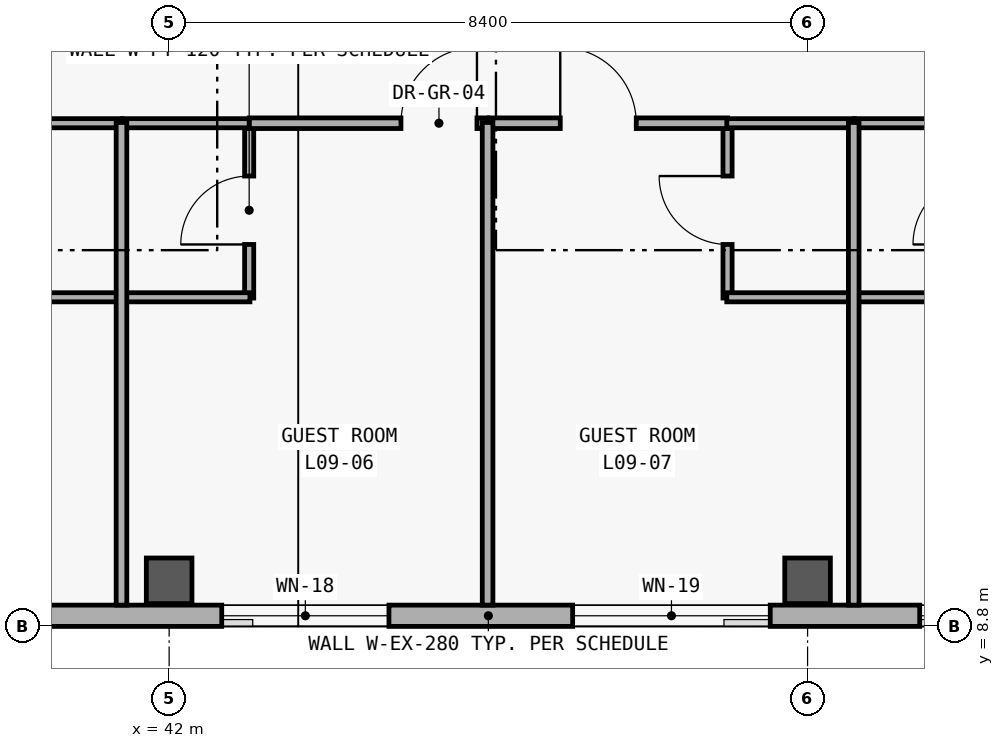
"""IFC4 building model, lengths in metres.
Left out: names, types, materials, properties, quantities, classifications, styles, units other than length and angle.
Written with IfcOpenShell. Run it as: python <this file> out.ifc"""

import sys

from ifc_helpers import new_model, si_unit, direction, frame, frame_2d, origin, origin_2d, place, context, subcontext, project, spatial, rectangle, extrude, element, fill, save


model = new_model("IFC4")
c1 = context("Model", 3, precision=1e-05, world=origin(), true_north=direction((0.0, 1.0)))
c2 = subcontext(c1, "Body", "Model", "MODEL_VIEW")
j1 = project(units=[si_unit("LENGTHUNIT", "METRE"), si_unit("PLANEANGLEUNIT", "RADIAN")], contexts=[c1])
p1 = place(None, origin())
s1 = spatial("IfcSite", under=j1, at=p1, CompositionType="ELEMENT")
p2 = place(p1, origin())
s2 = spatial("IfcBuilding", under=s1, at=p2, CompositionType="ELEMENT")
p3 = place(p2, frame((0.0, 0.0, 37.2)))
s3 = spatial("IfcBuildingStorey", under=s2, at=p3, CompositionType="ELEMENT", Elevation=37.2)
for number, where, z_axis, x_axis in (
    (1, (42.0, 9.4, 0.0), (0.0, 0.0, 1.0), (1.0, 0.0, 0.0)),
    (2, (50.4, 9.4, 0.0), (0.0, 0.0, 1.0), (1.0, 0.0, 0.0)),
):
    element("IfcColumn", number, at=place(p3, frame(where, z_axis=z_axis, x_axis=x_axis)), inside=s3, PredefinedType="COLUMN", context=c2, shape_type="SweptSolid", body=[
        extrude(rectangle(XDim=0.6, YDim=0.6, at=origin_2d()), origin(), (0.0, 0.0, 1.0), 3.6),
    ])
p4 = place(p3, frame((75.32, 8.94, 0.0), z_axis=(0.0, 0.0, 1.0), x_axis=(-1.0, 0.0, 0.0)))
e3 = element("IfcWall", 3, at=p4, inside=s3, PredefinedType="SOLIDWALL", context=c2, shape_type="SweptSolid", body=[
    extrude(rectangle(XDim=58.24, YDim=0.28, at=frame_2d((29.12, 0.0))), origin(), (0.0, 0.0, 1.0), 3.34),
])
p5 = place(p4, frame((53.861, 0.0, 0.85)))
e4 = element("IfcOpeningElement", 4, at=p5, cuts=e3, PredefinedType="OPENING", context=c2, shape_type="SweptSolid", body=[
    extrude(rectangle(XDim=3.5, YDim=2.0, at=frame_2d((1.75, 1.0))), frame((0.0, 0.15, 0.0), z_axis=(0.0, -1.0, 0.0), x_axis=(1.0, 0.0, 0.0)), (0.0, 0.0, 1.0), 0.3),
])
p6 = place(p4, frame((50.095, 0.0, 0.85)))
e5 = element("IfcOpeningElement", 5, at=p6, cuts=e3, PredefinedType="OPENING", context=c2, shape_type="SweptSolid", body=[
    extrude(rectangle(XDim=1.4, YDim=1.6, at=frame_2d((0.7, 0.8))), frame((0.0, 0.15, 0.0), z_axis=(0.0, -1.0, 0.0), x_axis=(1.0, 0.0, 0.0)), (0.0, 0.0, 1.0), 0.3),
])
p7 = place(p4, frame((45.178, 0.0, 0.85)))
e6 = element("IfcOpeningElement", 6, at=p7, cuts=e3, PredefinedType="OPENING", context=c2, shape_type="SweptSolid", body=[
    extrude(rectangle(XDim=1.6, YDim=1.6, at=frame_2d((0.8, 0.8))), frame((0.0, 0.15, 0.0), z_axis=(0.0, -1.0, 0.0), x_axis=(1.0, 0.0, 0.0)), (0.0, 0.0, 1.0), 0.3),
])
p8 = place(p4, frame((40.261, 0.0, 0.85)))
e7 = element("IfcOpeningElement", 7, at=p8, cuts=e3, PredefinedType="OPENING", context=c2, shape_type="SweptSolid", body=[
    extrude(rectangle(XDim=1.8, YDim=1.6, at=frame_2d((0.9, 0.8))), frame((0.0, 0.15, 0.0), z_axis=(0.0, -1.0, 0.0), x_axis=(1.0, 0.0, 0.0)), (0.0, 0.0, 1.0), 0.3),
])
p9 = place(p4, frame((35.345, 0.0, 0.85)))
e8 = element("IfcOpeningElement", 8, at=p9, cuts=e3, PredefinedType="OPENING", context=c2, shape_type="SweptSolid", body=[
    extrude(rectangle(XDim=2.0, YDim=1.65, at=frame_2d((1.0, 0.825))), frame((0.0, 0.15, 0.0), z_axis=(0.0, -1.0, 0.0), x_axis=(1.0, 0.0, 0.0)), (0.0, 0.0, 1.0), 0.3),
])
p10 = place(p4, frame((30.428, 0.0, 0.85)))
e9 = element("IfcOpeningElement", 9, at=p10, cuts=e3, PredefinedType="OPENING", context=c2, shape_type="SweptSolid", body=[
    extrude(rectangle(XDim=2.2, YDim=1.65, at=frame_2d((1.1, 0.825))), frame((0.0, 0.15, 0.0), z_axis=(0.0, -1.0, 0.0), x_axis=(1.0, 0.0, 0.0)), (0.0, 0.0, 1.0), 0.3),
])
p11 = place(p4, frame((25.411, 0.0, 0.85)))
e10 = element("IfcOpeningElement", 10, at=p11, cuts=e3, PredefinedType="OPENING", context=c2, shape_type="SweptSolid", body=[
    extrude(rectangle(XDim=2.6, YDim=2.2, at=frame_2d((1.3, 1.1))), frame((0.0, 0.15, 0.0), z_axis=(0.0, -1.0, 0.0), x_axis=(1.0, 0.0, 0.0)), (0.0, 0.0, 1.0), 0.3),
])
p12 = place(p4, frame((20.345, 0.0, 0.85)))
e11 = element("IfcOpeningElement", 11, at=p12, cuts=e3, PredefinedType="OPENING", context=c2, shape_type="SweptSolid", body=[
    extrude(rectangle(XDim=3.1, YDim=2.2, at=frame_2d((1.55, 1.1))), frame((0.0, 0.15, 0.0), z_axis=(0.0, -1.0, 0.0), x_axis=(1.0, 0.0, 0.0)), (0.0, 0.0, 1.0), 0.3),
])
p13 = place(p4, frame((15.278, 0.0, 0.85)))
e12 = element("IfcOpeningElement", 12, at=p13, cuts=e3, PredefinedType="OPENING", context=c2, shape_type="SweptSolid", body=[
    extrude(rectangle(XDim=3.6, YDim=2.3, at=frame_2d((1.8, 1.15))), frame((0.0, 0.15, 0.0), z_axis=(0.0, -1.0, 0.0), x_axis=(1.0, 0.0, 0.0)), (0.0, 0.0, 1.0), 0.3),
])
p14 = place(p4, frame((11.636, 0.0, 0.85)))
e13 = element("IfcOpeningElement", 13, at=p14, cuts=e3, PredefinedType="OPENING", context=c2, shape_type="SweptSolid", body=[
    extrude(rectangle(XDim=1.25, YDim=1.45, at=frame_2d((0.625, 0.725))), frame((0.0, 0.15, 0.0), z_axis=(0.0, -1.0, 0.0), x_axis=(1.0, 0.0, 0.0)), (0.0, 0.0, 1.0), 0.3),
])
p15 = place(p4, frame((6.77, 0.0, 0.85)))
e14 = element("IfcOpeningElement", 14, at=p15, cuts=e3, PredefinedType="OPENING", context=c2, shape_type="SweptSolid", body=[
    extrude(rectangle(XDim=1.35, YDim=1.55, at=frame_2d((0.675, 0.775))), frame((0.0, 0.15, 0.0), z_axis=(0.0, -1.0, 0.0), x_axis=(1.0, 0.0, 0.0)), (0.0, 0.0, 1.0), 0.3),
])
p16 = place(p4, frame((1.904, 0.0, 0.85)))
e15 = element("IfcOpeningElement", 15, at=p16, cuts=e3, PredefinedType="OPENING", context=c2, shape_type="SweptSolid", body=[
    extrude(rectangle(XDim=1.45, YDim=1.65, at=frame_2d((0.725, 0.825))), frame((0.0, 0.15, 0.0), z_axis=(0.0, -1.0, 0.0), x_axis=(1.0, 0.0, 0.0)), (0.0, 0.0, 1.0), 0.3),
])
p17 = place(p3, frame((43.053, 13.12, 0.0), z_axis=(0.0, 0.0, 1.0), x_axis=(0.0, 1.0, 0.0)))
e16 = element("IfcWall", 16, at=p17, inside=s3, PredefinedType="PARTITIONING", context=c2, shape_type="SweptSolid", body=[
    extrude(rectangle(XDim=2.31, YDim=0.12, at=frame_2d((1.155, 0.0))), origin(), (0.0, 0.0, 1.0), 2.48),
])
p18 = place(p17, frame((0.705, 0.0, 0.0)))
e17 = element("IfcOpeningElement", 17, at=p18, cuts=e16, PredefinedType="OPENING", context=c2, shape_type="SweptSolid", body=[
    extrude(rectangle(XDim=0.9, YDim=2.18, at=frame_2d((0.45, 1.09))), frame((0.0, 0.07, 0.0), z_axis=(0.0, -1.0, 0.0), x_axis=(1.0, 0.0, 0.0)), (0.0, 0.0, 1.0), 0.14),
])
p19 = place(p3, frame((49.347, 13.12, 0.0), z_axis=(0.0, 0.0, 1.0), x_axis=(0.0, 1.0, 0.0)))
e18 = element("IfcWall", 18, at=p19, inside=s3, PredefinedType="PARTITIONING", context=c2, shape_type="SweptSolid", body=[
    extrude(rectangle(XDim=2.31, YDim=0.12, at=frame_2d((1.155, 0.0))), origin(), (0.0, 0.0, 1.0), 2.48),
])
p20 = place(p19, frame((0.705, 0.0, 0.0)))
e19 = element("IfcOpeningElement", 19, at=p20, cuts=e18, PredefinedType="OPENING", context=c2, shape_type="SweptSolid", body=[
    extrude(rectangle(XDim=0.9, YDim=2.18, at=frame_2d((0.45, 1.09))), frame((0.0, 0.07, 0.0), z_axis=(0.0, -1.0, 0.0), x_axis=(1.0, 0.0, 0.0)), (0.0, 0.0, 1.0), 0.14),
])
p21 = place(p3, frame((43.053, 15.42, 0.0), z_axis=(0.0, 0.0, 1.0), x_axis=(1.0, 0.0, 0.0)))
e20 = element("IfcWall", 20, at=p21, inside=s3, PredefinedType="PARTITIONING", context=c2, shape_type="SweptSolid", body=[
    extrude(rectangle(XDim=3.137, YDim=0.14, at=frame_2d((1.568, 0.0))), origin(), (0.0, 0.0, 1.0), 2.48),
])
p22 = place(p21, frame((1.997, 0.0, 0.0)))
e21 = element("IfcOpeningElement", 21, at=p22, cuts=e20, PredefinedType="OPENING", context=c2, shape_type="SweptSolid", body=[
    extrude(rectangle(XDim=1.0, YDim=2.28, at=frame_2d((0.5, 1.14))), frame((0.0, 0.08, 0.0), z_axis=(0.0, -1.0, 0.0), x_axis=(1.0, 0.0, 0.0)), (0.0, 0.0, 1.0), 0.16),
])
p23 = place(p3, frame((46.21, 15.42, 0.0), z_axis=(0.0, 0.0, 1.0), x_axis=(1.0, 0.0, 0.0)))
e22 = element("IfcWall", 22, at=p23, inside=s3, PredefinedType="PARTITIONING", context=c2, shape_type="SweptSolid", body=[
    extrude(rectangle(XDim=3.137, YDim=0.14, at=frame_2d((1.568, 0.0))), origin(), (0.0, 0.0, 1.0), 2.48),
])
p24 = place(p23, frame((0.936, 0.0, 0.0)))
e23 = element("IfcOpeningElement", 23, at=p24, cuts=e22, PredefinedType="OPENING", context=c2, shape_type="SweptSolid", body=[
    extrude(rectangle(XDim=1.0, YDim=2.28, at=frame_2d((0.5, 1.14))), frame((0.0, 0.08, 0.0), z_axis=(0.0, -1.0, 0.0), x_axis=(1.0, 0.0, 0.0)), (0.0, 0.0, 1.0), 0.16),
])
for number, where, z_axis, x_axis in (
    (24, (39.703, 13.13, 0.0), (0.0, 0.0, 1.0), (1.0, 0.0, 0.0)),
    (25, (39.703, 15.42, 0.0), (0.0, 0.0, 1.0), (1.0, 0.0, 0.0)),
):
    element("IfcWall", number, at=place(p3, frame(where, z_axis=z_axis, x_axis=x_axis)), inside=s3, PredefinedType="PARTITIONING", context=c2, shape_type="SweptSolid", body=[
        extrude(rectangle(XDim=1.68, YDim=0.12, at=frame_2d((0.84, 0.0))), origin(), (0.0, 0.0, 1.0), 2.48),
    ])
p25 = place(p3, frame((41.383, 13.13, 0.0), z_axis=(0.0, 0.0, 1.0), x_axis=(1.0, 0.0, 0.0)))
e26 = element("IfcWall", 26, at=p25, inside=s3, PredefinedType="PARTITIONING", context=c2, shape_type="SweptSolid", body=[
    extrude(rectangle(XDim=1.68, YDim=0.12, at=frame_2d((0.84, 0.0))), origin(), (0.0, 0.0, 1.0), 2.48),
])
p26 = place(p3, frame((41.383, 15.42, 0.0), z_axis=(0.0, 0.0, 1.0), x_axis=(1.0, 0.0, 0.0)))
e27 = element("IfcWall", 27, at=p26, inside=s3, PredefinedType="PARTITIONING", context=c2, shape_type="SweptSolid", body=[
    extrude(rectangle(XDim=1.67, YDim=0.12, at=frame_2d((0.835, 0.0))), origin(), (0.0, 0.0, 1.0), 2.48),
])
for number, where, z_axis, x_axis in (
    (28, (49.337, 13.13, 0.0), (0.0, 0.0, 1.0), (1.0, 0.0, 0.0)),
    (29, (49.337, 15.42, 0.0), (0.0, 0.0, 1.0), (1.0, 0.0, 0.0)),
):
    element("IfcWall", number, at=place(p3, frame(where, z_axis=z_axis, x_axis=x_axis)), inside=s3, PredefinedType="PARTITIONING", context=c2, shape_type="SweptSolid", body=[
        extrude(rectangle(XDim=1.68, YDim=0.12, at=frame_2d((0.84, 0.0))), origin(), (0.0, 0.0, 1.0), 2.48),
    ])
p27 = place(p3, frame((51.017, 13.13, 0.0), z_axis=(0.0, 0.0, 1.0), x_axis=(1.0, 0.0, 0.0)))
e30 = element("IfcWall", 30, at=p27, inside=s3, PredefinedType="PARTITIONING", context=c2, shape_type="SweptSolid", body=[
    extrude(rectangle(XDim=1.68, YDim=0.12, at=frame_2d((0.84, 0.0))), origin(), (0.0, 0.0, 1.0), 2.48),
])
p28 = place(p3, frame((51.017, 15.42, 0.0), z_axis=(0.0, 0.0, 1.0), x_axis=(1.0, 0.0, 0.0)))
e31 = element("IfcWall", 31, at=p28, inside=s3, PredefinedType="PARTITIONING", context=c2, shape_type="SweptSolid", body=[
    extrude(rectangle(XDim=1.67, YDim=0.12, at=frame_2d((0.835, 0.0))), origin(), (0.0, 0.0, 1.0), 2.48),
])
for number, where, z_axis, x_axis in (
    (32, (41.373, 9.08, 0.0), (0.0, 0.0, 1.0), (0.0, 1.0, 0.0)),
    (33, (46.19, 9.08, 0.0), (0.0, 0.0, 1.0), (0.0, 1.0, 0.0)),
    (34, (51.007, 9.08, 0.0), (0.0, 0.0, 1.0), (0.0, 1.0, 0.0)),
):
    element("IfcWall", number, at=place(p3, frame(where, z_axis=z_axis, x_axis=x_axis)), inside=s3, PredefinedType="PARTITIONING", context=c2, shape_type="SweptSolid", body=[
        extrude(rectangle(XDim=6.35, YDim=0.14, at=frame_2d((3.175, 0.0))), origin(), (0.0, 0.0, 1.0), 2.48),
    ])
p29 = place(p10, origin())
e35 = element("IfcWindow", 35, at=p29, inside=s3, PartitioningType="SINGLE_PANEL", PredefinedType="WINDOW", context=c2, shape_type="SweptSolid", body=[
    extrude(rectangle(XDim=2.2, YDim=1.65, at=frame_2d((1.1, 0.825))), frame((0.0, 0.03, 0.0), z_axis=(0.0, -1.0, 0.0), x_axis=(1.0, 0.0, 0.0)), (0.0, 0.0, 1.0), 0.06),
])
fill(e9, e35)
p30 = place(p11, origin())
e36 = element("IfcWindow", 36, at=p30, inside=s3, PartitioningType="SINGLE_PANEL", PredefinedType="WINDOW", context=c2, shape_type="SweptSolid", body=[
    extrude(rectangle(XDim=2.6, YDim=2.2, at=frame_2d((1.3, 1.1))), frame((0.0, 0.03, 0.0), z_axis=(0.0, -1.0, 0.0), x_axis=(1.0, 0.0, 0.0)), (0.0, 0.0, 1.0), 0.06),
])
fill(e10, e36)
p31 = place(p12, origin())
e37 = element("IfcWindow", 37, at=p31, inside=s3, PartitioningType="SINGLE_PANEL", PredefinedType="WINDOW", context=c2, shape_type="SweptSolid", body=[
    extrude(rectangle(XDim=3.1, YDim=2.2, at=frame_2d((1.55, 1.1))), frame((0.0, 0.03, 0.0), z_axis=(0.0, -1.0, 0.0), x_axis=(1.0, 0.0, 0.0)), (0.0, 0.0, 1.0), 0.06),
])
fill(e11, e37)
p32 = place(p18, origin())
e38 = element("IfcDoor", 38, at=p32, inside=s3, OperationType="SINGLE_SWING_LEFT", PredefinedType="DOOR", context=c2, shape_type="SweptSolid", body=[
    extrude(rectangle(XDim=0.9, YDim=2.18, at=frame_2d((0.45, 1.09))), frame((0.0, 0.025, 0.0), z_axis=(0.0, -1.0, 0.0), x_axis=(1.0, 0.0, 0.0)), (0.0, 0.0, 1.0), 0.05),
])
fill(e17, e38)
p33 = place(p20, origin())
e39 = element("IfcDoor", 39, at=p33, inside=s3, OperationType="SINGLE_SWING_RIGHT", PredefinedType="DOOR", context=c2, shape_type="SweptSolid", body=[
    extrude(rectangle(XDim=0.9, YDim=2.18, at=frame_2d((0.45, 1.09))), frame((0.0, 0.025, 0.0), z_axis=(0.0, -1.0, 0.0), x_axis=(1.0, 0.0, 0.0)), (0.0, 0.0, 1.0), 0.05),
])
fill(e19, e39)
p34 = place(p22, origin())
e40 = element("IfcDoor", 40, at=p34, inside=s3, OperationType="SINGLE_SWING_RIGHT", PredefinedType="DOOR", context=c2, shape_type="SweptSolid", body=[
    extrude(rectangle(XDim=1.0, YDim=2.28, at=frame_2d((0.5, 1.14))), frame((0.0, 0.025, 0.0), z_axis=(0.0, -1.0, 0.0), x_axis=(1.0, 0.0, 0.0)), (0.0, 0.0, 1.0), 0.05),
])
fill(e21, e40)
p35 = place(p24, origin())
e41 = element("IfcDoor", 41, at=p35, inside=s3, OperationType="SINGLE_SWING_LEFT", PredefinedType="DOOR", context=c2, shape_type="SweptSolid", body=[
    extrude(rectangle(XDim=1.0, YDim=2.28, at=frame_2d((0.5, 1.14))), frame((0.0, 0.025, 0.0), z_axis=(0.0, -1.0, 0.0), x_axis=(1.0, 0.0, 0.0)), (0.0, 0.0, 1.0), 0.05),
])
fill(e23, e41)
save(model, sys.argv[1])
